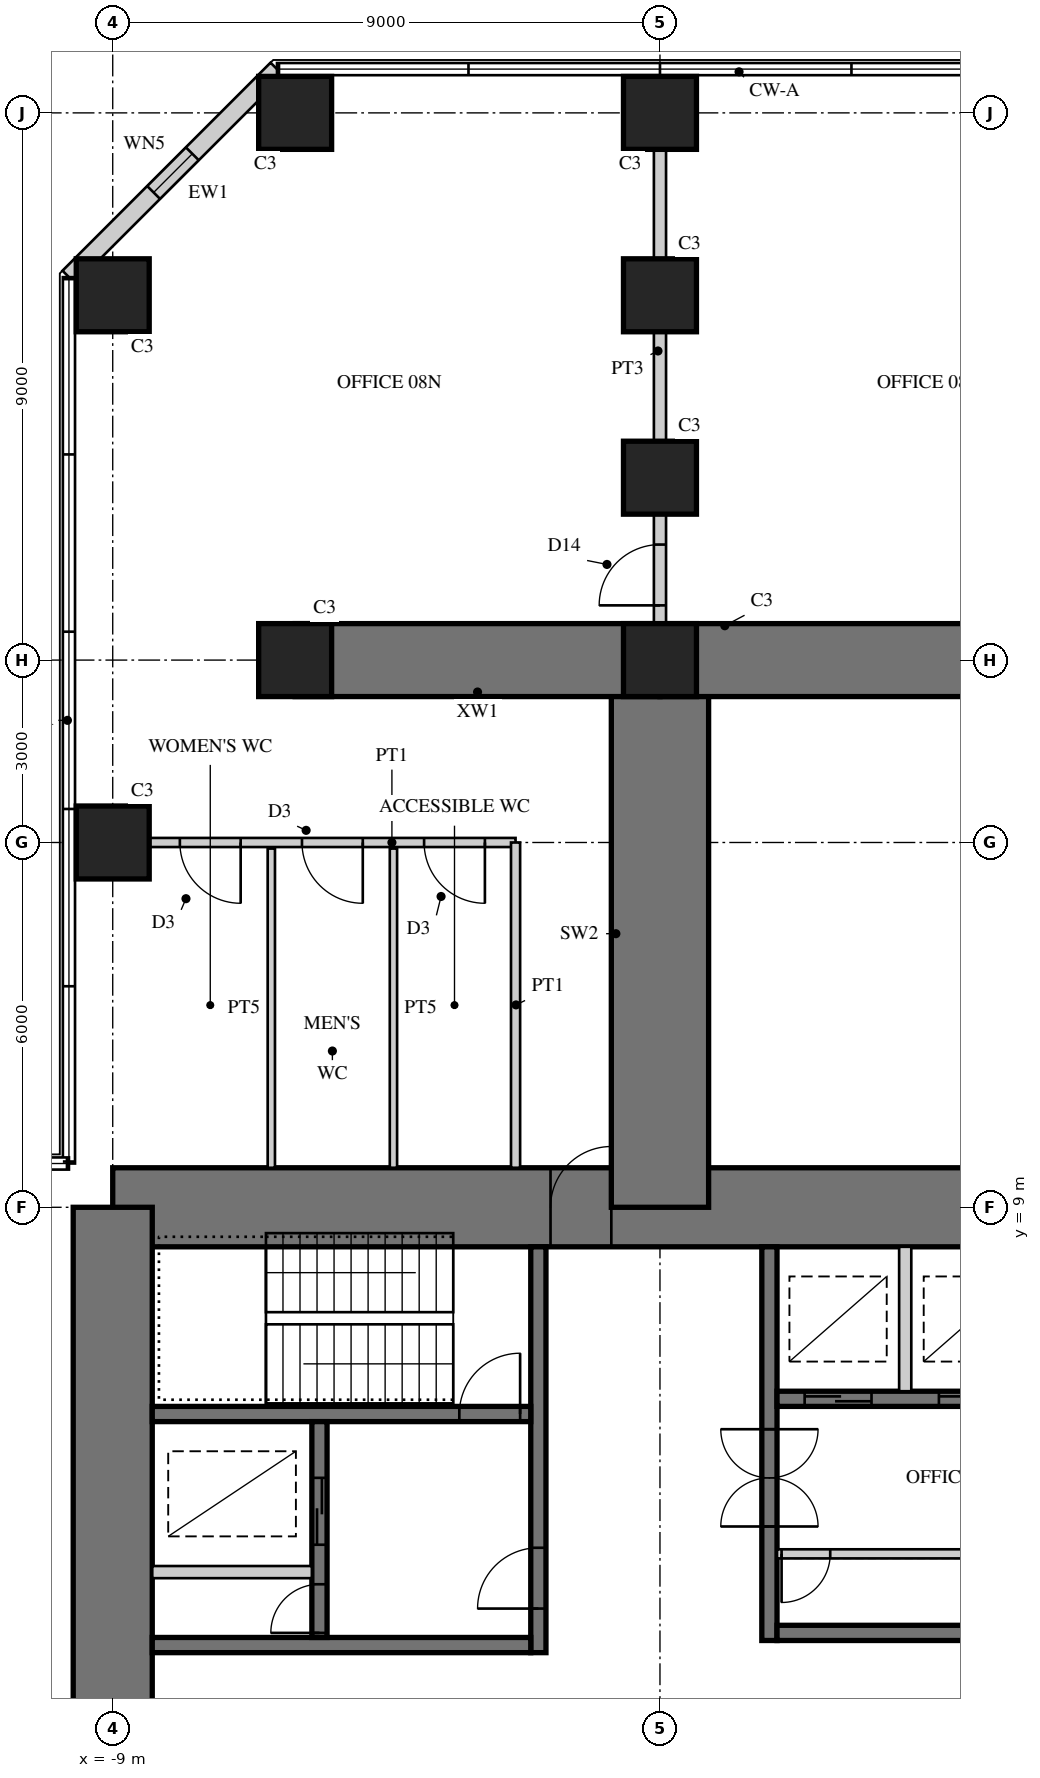
"""IFC4 building model, lengths in metres.
Left out: names, types, materials, properties, quantities, classifications, styles, units other than length and angle.
Written with IfcOpenShell. Run it as: python <this file> out.ifc"""

import sys

from ifc_helpers import new_model, si_unit, direction, frame, frame_2d, origin, origin_2d, place, context, subcontext, project, spatial, rectangle, hollow_rectangle, extrude, element, fill, save


model = new_model("IFC4")
c1 = context("Model", 3, precision=1e-05, world=origin(), true_north=direction((0.0, 1.0)))
c2 = subcontext(c1, "Body", "Model", "MODEL_VIEW")
j1 = project(units=[si_unit("LENGTHUNIT", "METRE"), si_unit("PLANEANGLEUNIT", "RADIAN")], contexts=[c1])
p1 = place(None, origin())
s1 = spatial("IfcSite", under=j1, at=p1, CompositionType="ELEMENT")
p2 = place(p1, origin())
s2 = spatial("IfcBuilding", under=s1, at=p2, CompositionType="ELEMENT")
p3 = place(p2, frame((0.0, 0.0, 35.5)))
s3 = spatial("IfcBuildingStorey", under=s2, at=p3, CompositionType="ELEMENT", Elevation=35.5)
p4 = place(p3, frame((9.0, 9.0, 0.0), z_axis=(0.0, 0.0, 1.0), x_axis=(-1.0, 0.0, 0.0)))
e1 = element("IfcWall", 1, at=p4, inside=s3, PredefinedType="SHEAR", context=c2, shape_type="SweptSolid", body=[
    extrude(rectangle(XDim=18.0, YDim=1.3, at=frame_2d((9.0, 0.0))), origin(), (0.0, 0.0, 1.0), 4.0),
])
p5 = place(p4, frame((9.8, 0.0, 0.0)))
e2 = element("IfcOpeningElement", 2, at=p5, cuts=e1, PredefinedType="OPENING", context=c2, shape_type="SweptSolid", body=[
    extrude(rectangle(XDim=1.0, YDim=2.4, at=frame_2d((0.5, 1.2))), frame((0.0, 0.66, 0.0), z_axis=(0.0, -1.0, 0.0), x_axis=(1.0, 0.0, 0.0)), (0.0, 0.0, 1.0), 1.32),
])
p6 = place(p3, frame((-9.0, 9.0, 0.0), z_axis=(0.0, 0.0, 1.0), x_axis=(0.0, -1.0, 0.0)))
e3 = element("IfcWall", 3, at=p6, inside=s3, PredefinedType="SHEAR", context=c2, shape_type="SweptSolid", body=[
    extrude(rectangle(XDim=18.0, YDim=1.3, at=frame_2d((9.0, 0.0))), origin(), (0.0, 0.0, 1.0), 4.0),
])
p7 = place(p6, frame((9.8, 0.0, 0.0)))
e4 = element("IfcOpeningElement", 4, at=p7, cuts=e3, PredefinedType="OPENING", context=c2, shape_type="SweptSolid", body=[
    extrude(rectangle(XDim=1.0, YDim=2.4, at=frame_2d((0.5, 1.2))), frame((0.0, 0.66, 0.0), z_axis=(0.0, -1.0, 0.0), x_axis=(1.0, 0.0, 0.0)), (0.0, 0.0, 1.0), 1.32),
])
p8 = place(p3, frame((1.8, 1.875, 0.0), z_axis=(0.0, 0.0, 1.0), x_axis=(0.0, 1.0, 0.0)))
e5 = element("IfcWall", 5, at=p8, inside=s3, PredefinedType="SHEAR", context=c2, shape_type="SweptSolid", body=[
    extrude(rectangle(XDim=6.475, YDim=0.25, at=frame_2d((3.238, 0.0))), origin(), (0.0, 0.0, 1.0), 4.0),
])
p9 = place(p8, frame((1.875, 0.0, 0.0)))
e6 = element("IfcOpeningElement", 6, at=p9, cuts=e5, PredefinedType="OPENING", context=c2, shape_type="SweptSolid", body=[
    extrude(rectangle(XDim=1.6, YDim=2.4, at=frame_2d((0.8, 1.2))), frame((0.0, 0.135, 0.0), z_axis=(0.0, -1.0, 0.0), x_axis=(1.0, 0.0, 0.0)), (0.0, 0.0, 1.0), 0.27),
])
p10 = place(p3, frame((1.925, 2.0, 0.0), z_axis=(0.0, 0.0, 1.0), x_axis=(1.0, 0.0, 0.0)))
e7 = element("IfcWall", 7, at=p10, inside=s3, PredefinedType="SHEAR", context=c2, shape_type="SweptSolid", body=[
    extrude(rectangle(XDim=6.425, YDim=0.25, at=frame_2d((3.212, 0.0))), origin(), (0.0, 0.0, 1.0), 4.0),
])
p11 = place(p3, frame((1.925, 5.85, 0.0), z_axis=(0.0, 0.0, 1.0), x_axis=(1.0, 0.0, 0.0)))
e8 = element("IfcWall", 8, at=p11, inside=s3, PredefinedType="SHEAR", context=c2, shape_type="SweptSolid", body=[
    extrude(rectangle(XDim=6.425, YDim=0.25, at=frame_2d((3.212, 0.0))), origin(), (0.0, 0.0, 1.0), 4.0),
])
p12 = place(p11, frame((0.454, 0.0, 0.0)))
e9 = element("IfcOpeningElement", 9, at=p12, cuts=e8, PredefinedType="OPENING", context=c2, shape_type="SweptSolid", body=[
    extrude(rectangle(XDim=1.1, YDim=2.2, at=frame_2d((0.55, 1.1))), frame((0.0, 0.135, 0.0), z_axis=(0.0, -1.0, 0.0), x_axis=(1.0, 0.0, 0.0)), (0.0, 0.0, 1.0), 0.27),
])
p13 = place(p11, frame((2.663, 0.0, 0.0)))
e10 = element("IfcOpeningElement", 10, at=p13, cuts=e8, PredefinedType="OPENING", context=c2, shape_type="SweptSolid", body=[
    extrude(rectangle(XDim=1.1, YDim=2.2, at=frame_2d((0.55, 1.1))), frame((0.0, 0.135, 0.0), z_axis=(0.0, -1.0, 0.0), x_axis=(1.0, 0.0, 0.0)), (0.0, 0.0, 1.0), 0.27),
])
p14 = place(p11, frame((4.871, 0.0, 0.0)))
e11 = element("IfcOpeningElement", 11, at=p14, cuts=e8, PredefinedType="OPENING", context=c2, shape_type="SweptSolid", body=[
    extrude(rectangle(XDim=1.1, YDim=2.2, at=frame_2d((0.55, 1.1))), frame((0.0, 0.135, 0.0), z_axis=(0.0, -1.0, 0.0), x_axis=(1.0, 0.0, 0.0)), (0.0, 0.0, 1.0), 0.27),
])
p15 = place(p3, frame((1.925, 3.3, 0.0), z_axis=(0.0, 0.0, 1.0), x_axis=(1.0, 0.0, 0.0)))
e12 = element("IfcWall", 12, at=p15, inside=s3, PredefinedType="PARTITIONING", context=c2, shape_type="SweptSolid", body=[
    extrude(rectangle(XDim=6.425, YDim=0.15, at=frame_2d((3.212, 0.0))), origin(), (0.0, 0.0, 1.0), 4.0),
])
p16 = place(p15, frame((0.075, 0.0, 0.0)))
e13 = element("IfcOpeningElement", 13, at=p16, cuts=e12, PredefinedType="OPENING", context=c2, shape_type="SweptSolid", body=[
    extrude(rectangle(XDim=0.8, YDim=2.1, at=frame_2d((0.4, 1.05))), frame((0.0, 0.085, 0.0), z_axis=(0.0, -1.0, 0.0), x_axis=(1.0, 0.0, 0.0)), (0.0, 0.0, 1.0), 0.17),
])
p17 = place(p15, frame((3.675, 0.0, 0.0)))
e14 = element("IfcOpeningElement", 14, at=p17, cuts=e12, PredefinedType="OPENING", context=c2, shape_type="SweptSolid", body=[
    extrude(rectangle(XDim=0.8, YDim=2.1, at=frame_2d((0.4, 1.05))), frame((0.0, 0.085, 0.0), z_axis=(0.0, -1.0, 0.0), x_axis=(1.0, 0.0, 0.0)), (0.0, 0.0, 1.0), 0.17),
])
p18 = place(p3, frame((4.033, 5.975, 0.0), z_axis=(0.0, 0.0, 1.0), x_axis=(0.0, 1.0, 0.0)))
e15 = element("IfcWall", 15, at=p18, inside=s3, PredefinedType="PARTITIONING", context=c2, shape_type="SweptSolid", body=[
    extrude(rectangle(XDim=2.375, YDim=0.2, at=frame_2d((1.188, 0.0))), origin(), (0.0, 0.0, 1.0), 4.0),
])
p19 = place(p3, frame((-2.0, 1.675, 0.0), z_axis=(0.0, 0.0, 1.0), x_axis=(0.0, 1.0, 0.0)))
e16 = element("IfcWall", 16, at=p19, inside=s3, PredefinedType="SHEAR", context=c2, shape_type="SweptSolid", body=[
    extrude(rectangle(XDim=6.675, YDim=0.25, at=frame_2d((3.337, 0.0))), origin(), (0.0, 0.0, 1.0), 4.0),
])
p20 = place(p19, frame((0.725, 0.0, 0.0)))
e17 = element("IfcOpeningElement", 17, at=p20, cuts=e16, PredefinedType="OPENING", context=c2, shape_type="SweptSolid", body=[
    extrude(rectangle(XDim=1.0, YDim=2.1, at=frame_2d((0.5, 1.05))), frame((0.0, 0.135, 0.0), z_axis=(0.0, -1.0, 0.0), x_axis=(1.0, 0.0, 0.0)), (0.0, 0.0, 1.0), 0.27),
])
p21 = place(p3, frame((-2.125, 1.8, 0.0), z_axis=(0.0, 0.0, 1.0), x_axis=(-1.0, 0.0, 0.0)))
e18 = element("IfcWall", 18, at=p21, inside=s3, PredefinedType="SHEAR", context=c2, shape_type="SweptSolid", body=[
    extrude(rectangle(XDim=6.225, YDim=0.25, at=frame_2d((3.113, 0.0))), origin(), (0.0, 0.0, 1.0), 4.0),
])
p22 = place(p3, frame((-2.125, 5.6, 0.0), z_axis=(0.0, 0.0, 1.0), x_axis=(-1.0, 0.0, 0.0)))
e19 = element("IfcWall", 19, at=p22, inside=s3, PredefinedType="SHEAR", context=c2, shape_type="SweptSolid", body=[
    extrude(rectangle(XDim=6.225, YDim=0.25, at=frame_2d((3.113, 0.0))), origin(), (0.0, 0.0, 1.0), 4.0),
])
p23 = place(p22, frame((0.175, 0.0, 0.0)))
e20 = element("IfcOpeningElement", 20, at=p23, cuts=e19, PredefinedType="OPENING", context=c2, shape_type="SweptSolid", body=[
    extrude(rectangle(XDim=1.0, YDim=2.1, at=frame_2d((0.5, 1.05))), frame((0.0, 0.135, 0.0), z_axis=(0.0, -1.0, 0.0), x_axis=(1.0, 0.0, 0.0)), (0.0, 0.0, 1.0), 0.27),
])
p24 = place(p3, frame((-5.6, 1.925, 0.0), z_axis=(0.0, 0.0, 1.0), x_axis=(0.0, 1.0, 0.0)))
e21 = element("IfcWall", 21, at=p24, inside=s3, PredefinedType="SHEAR", context=c2, shape_type="SweptSolid", body=[
    extrude(rectangle(XDim=3.55, YDim=0.25, at=frame_2d((1.775, 0.0))), origin(), (0.0, 0.0, 1.0), 4.0),
])
p25 = place(p24, frame((1.525, 0.0, 0.0)))
e22 = element("IfcOpeningElement", 22, at=p25, cuts=e21, PredefinedType="OPENING", context=c2, shape_type="SweptSolid", body=[
    extrude(rectangle(XDim=1.1, YDim=2.2, at=frame_2d((0.55, 1.1))), frame((0.0, 0.135, 0.0), z_axis=(0.0, -1.0, 0.0), x_axis=(1.0, 0.0, 0.0)), (0.0, 0.0, 1.0), 0.27),
])
p26 = place(p24, frame((0.075, 0.0, 0.0)))
e23 = element("IfcOpeningElement", 23, at=p26, cuts=e21, PredefinedType="OPENING", context=c2, shape_type="SweptSolid", body=[
    extrude(rectangle(XDim=0.8, YDim=2.1, at=frame_2d((0.4, 1.05))), frame((0.0, 0.135, 0.0), z_axis=(0.0, -1.0, 0.0), x_axis=(1.0, 0.0, 0.0)), (0.0, 0.0, 1.0), 0.27),
])
p27 = place(p3, frame((-5.725, 3.0, 0.0), z_axis=(0.0, 0.0, 1.0), x_axis=(-1.0, 0.0, 0.0)))
e24 = element("IfcWall", 24, at=p27, inside=s3, PredefinedType="PARTITIONING", context=c2, shape_type="SweptSolid", body=[
    extrude(rectangle(XDim=2.625, YDim=0.2, at=frame_2d((1.312, 0.0))), origin(), (0.0, 0.0, 1.0), 4.0),
])
p28 = place(p3, frame((0.0, 9.0, 0.0), z_axis=(0.0, 0.0, 1.0), x_axis=(0.0, 1.0, 0.0)))
e25 = element("IfcWall", 25, at=p28, inside=s3, PredefinedType="SHEAR", context=c2, shape_type="SweptSolid", body=[
    extrude(rectangle(XDim=9.0, YDim=1.6, at=frame_2d((4.5, 0.0))), origin(), (0.0, 0.0, 1.0), 4.0),
])
for number, where, z_axis, x_axis in (
    (26, (0.0, 18.0, 0.0), (0.0, 0.0, 1.0), (-1.0, 0.0, 0.0)),
    (27, (0.0, 18.0, 0.0), (0.0, 0.0, 1.0), (1.0, 0.0, 0.0)),
):
    element("IfcWall", number, at=place(p3, frame(where, z_axis=z_axis, x_axis=x_axis)), inside=s3, PredefinedType="SHEAR", context=c2, shape_type="SweptSolid", body=[
        extrude(rectangle(XDim=6.0, YDim=1.2, at=frame_2d((3.0, 0.0))), origin(), (0.0, 0.0, 1.0), 4.0),
    ])
for number, where, z_axis, x_axis in (
    (28, (-9.0, 15.0, 0.0), (0.0, 0.0, 1.0), (1.0, 0.0, 0.0)),
    (29, (-9.0, 24.0, 0.0), (0.0, 0.0, 1.0), (1.0, 0.0, 0.0)),
    (30, (0.0, 27.0, 0.0), (0.0, 0.0, 1.0), (1.0, 0.0, 0.0)),
    (31, (-6.0, 27.0, 0.0), (0.0, 0.0, 1.0), (1.0, 0.0, 0.0)),
    (32, (0.0, 18.0, 0.0), (0.0, 0.0, 1.0), (1.0, 0.0, 0.0)),
    (33, (-6.0, 18.0, 0.0), (0.0, 0.0, 1.0), (1.0, 0.0, 0.0)),
    (34, (0.0, 21.0, 0.0), (0.0, 0.0, 1.0), (1.0, 0.0, 0.0)),
    (35, (0.0, 24.0, 0.0), (0.0, 0.0, 1.0), (1.0, 0.0, 0.0)),
):
    element("IfcColumn", number, at=place(p3, frame(where, z_axis=z_axis, x_axis=x_axis)), inside=s3, PredefinedType="COLUMN", context=c2, shape_type="SweptSolid", body=[
        extrude(rectangle(XDim=1.2, YDim=1.2, at=origin_2d()), origin(), (0.0, 0.0, 1.0), 4.0),
    ])
p29 = place(p3, frame((-6.298, 27.72, 0.0), z_axis=(0.0, 0.0, 1.0), x_axis=(-0.707106781187, -0.707106781187, 0.0)))
e36 = element("IfcWall", 36, at=p29, inside=s3, PredefinedType="SOLIDWALL", context=c2, shape_type="SweptSolid", body=[
    extrude(rectangle(XDim=4.839, YDim=0.3, at=frame_2d((2.419, 0.0))), origin(), (0.0, 0.0, 1.0), 3.8),
])
p30 = place(p29, frame((1.969, 0.0, 0.3)))
e37 = element("IfcOpeningElement", 37, at=p30, cuts=e36, PredefinedType="OPENING", context=c2, shape_type="SweptSolid", body=[
    extrude(rectangle(XDim=0.9, YDim=2.4, at=frame_2d((0.45, 1.2))), frame((0.0, 0.16, 0.0), z_axis=(0.0, -1.0, 0.0), x_axis=(1.0, 0.0, 0.0)), (0.0, 0.0, 1.0), 0.32),
])
p31 = place(p3, frame((-2.375, 15.0, 0.0), z_axis=(0.0, 0.0, 1.0), x_axis=(-1.0, 0.0, 0.0)))
e38 = element("IfcWall", 38, at=p31, inside=s3, PredefinedType="PARTITIONING", context=c2, shape_type="SweptSolid", body=[
    extrude(rectangle(XDim=6.025, YDim=0.15, at=frame_2d((3.012, 0.0))), origin(), (0.0, 0.0, 1.0), 2.95),
])
p32 = place(p31, frame((0.504, 0.0, 0.0)))
e39 = element("IfcOpeningElement", 39, at=p32, cuts=e38, PredefinedType="OPENING", context=c2, shape_type="SweptSolid", body=[
    extrude(rectangle(XDim=1.0, YDim=2.1, at=frame_2d((0.5, 1.05))), frame((0.0, 0.085, 0.0), z_axis=(0.0, -1.0, 0.0), x_axis=(1.0, 0.0, 0.0)), (0.0, 0.0, 1.0), 0.17),
])
p33 = place(p31, frame((2.512, 0.0, 0.0)))
e40 = element("IfcOpeningElement", 40, at=p33, cuts=e38, PredefinedType="OPENING", context=c2, shape_type="SweptSolid", body=[
    extrude(rectangle(XDim=1.0, YDim=2.1, at=frame_2d((0.5, 1.05))), frame((0.0, 0.085, 0.0), z_axis=(0.0, -1.0, 0.0), x_axis=(1.0, 0.0, 0.0)), (0.0, 0.0, 1.0), 0.17),
])
p34 = place(p31, frame((4.521, 0.0, 0.0)))
e41 = element("IfcOpeningElement", 41, at=p34, cuts=e38, PredefinedType="OPENING", context=c2, shape_type="SweptSolid", body=[
    extrude(rectangle(XDim=1.0, YDim=2.1, at=frame_2d((0.5, 1.05))), frame((0.0, 0.085, 0.0), z_axis=(0.0, -1.0, 0.0), x_axis=(1.0, 0.0, 0.0)), (0.0, 0.0, 1.0), 0.17),
])
p35 = place(p3, frame((-2.375, 9.65, 0.0), z_axis=(0.0, 0.0, 1.0), x_axis=(0.0, 1.0, 0.0)))
e42 = element("IfcWall", 42, at=p35, inside=s3, PredefinedType="PARTITIONING", context=c2, shape_type="SweptSolid", body=[
    extrude(rectangle(XDim=5.35, YDim=0.15, at=frame_2d((2.675, 0.0))), origin(), (0.0, 0.0, 1.0), 3.8),
])
for number, where, z_axis, x_axis in (
    (43, (-4.383, 9.65, 0.0), (0.0, 0.0, 1.0), (0.0, 1.0, 0.0)),
    (44, (-6.392, 9.65, 0.0), (0.0, 0.0, 1.0), (0.0, 1.0, 0.0)),
):
    element("IfcWall", number, at=place(p3, frame(where, z_axis=z_axis, x_axis=x_axis)), inside=s3, PredefinedType="PLUMBINGWALL", context=c2, shape_type="SweptSolid", body=[
        extrude(rectangle(XDim=5.25, YDim=0.12, at=frame_2d((2.625, 0.0))), origin(), (0.0, 0.0, 1.0), 3.8),
    ])
p36 = place(p3, frame((0.0, 18.0, 0.0), z_axis=(0.0, 0.0, 1.0), x_axis=(0.0, 1.0, 0.0)))
e45 = element("IfcWall", 45, at=p36, inside=s3, PredefinedType="SOLIDWALL", context=c2, shape_type="SweptSolid", body=[
    extrude(rectangle(XDim=3.0, YDim=0.2, at=frame_2d((1.5, 0.0))), origin(), (0.0, 0.0, 1.0), 3.8),
])
p37 = place(p36, frame((0.9, 0.0, 0.0)))
e46 = element("IfcOpeningElement", 46, at=p37, cuts=e45, PredefinedType="OPENING", context=c2, shape_type="SweptSolid", body=[
    extrude(rectangle(XDim=1.0, YDim=2.2, at=frame_2d((0.5, 1.1))), frame((0.0, 0.11, 0.0), z_axis=(0.0, -1.0, 0.0), x_axis=(1.0, 0.0, 0.0)), (0.0, 0.0, 1.0), 0.22),
])
p38 = place(p3, frame((0.0, 21.0, 0.0), z_axis=(0.0, 0.0, 1.0), x_axis=(0.0, 1.0, 0.0)))
e47 = element("IfcWall", 47, at=p38, inside=s3, PredefinedType="SOLIDWALL", context=c2, shape_type="SweptSolid", body=[
    extrude(rectangle(XDim=6.0, YDim=0.2, at=frame_2d((3.0, 0.0))), origin(), (0.0, 0.0, 1.0), 2.9),
])
p39 = place(p30, origin())
e48 = element("IfcWindow", 48, at=p39, inside=s3, PartitioningType="SINGLE_PANEL", PredefinedType="WINDOW", context=c2, shape_type="SweptSolid", body=[
    extrude(hollow_rectangle(XDim=0.9, YDim=2.4, WallThickness=0.06, at=frame_2d((0.45, 1.2))), frame((0.0, 0.03, 0.0), z_axis=(0.0, -1.0, 0.0), x_axis=(1.0, 0.0, 0.0)), (0.0, 0.0, 1.0), 0.06),
    extrude(rectangle(XDim=0.779, YDim=2.279, at=frame_2d((0.45, 1.2))), frame((0.0, 0.03, 0.0), z_axis=(0.0, -1.0, 0.0), x_axis=(1.0, 0.0, 0.0)), (0.0, 0.0, 1.0), 0.06),
])
fill(e37, e48)
p40 = place(p32, origin())
e49 = element("IfcDoor", 49, at=p40, inside=s3, OperationType="SINGLE_SWING_LEFT", PredefinedType="DOOR", context=c2, shape_type="SweptSolid", body=[
    extrude(rectangle(XDim=1.0, YDim=2.1, at=frame_2d((0.5, 1.05))), frame((0.0, 0.025, 0.0), z_axis=(0.0, -1.0, 0.0), x_axis=(1.0, 0.0, 0.0)), (0.0, 0.0, 1.0), 0.05),
])
fill(e39, e49)
p41 = place(p33, origin())
e50 = element("IfcDoor", 50, at=p41, inside=s3, OperationType="SINGLE_SWING_LEFT", PredefinedType="DOOR", context=c2, shape_type="SweptSolid", body=[
    extrude(rectangle(XDim=1.0, YDim=2.1, at=frame_2d((0.5, 1.05))), frame((0.0, 0.025, 0.0), z_axis=(0.0, -1.0, 0.0), x_axis=(1.0, 0.0, 0.0)), (0.0, 0.0, 1.0), 0.05),
])
fill(e40, e50)
p42 = place(p34, origin())
e51 = element("IfcDoor", 51, at=p42, inside=s3, OperationType="SINGLE_SWING_LEFT", PredefinedType="DOOR", context=c2, shape_type="SweptSolid", body=[
    extrude(rectangle(XDim=1.0, YDim=2.1, at=frame_2d((0.5, 1.05))), frame((0.0, 0.025, 0.0), z_axis=(0.0, -1.0, 0.0), x_axis=(1.0, 0.0, 0.0)), (0.0, 0.0, 1.0), 0.05),
])
fill(e41, e51)
p43 = place(p37, origin())
e52 = element("IfcDoor", 52, at=p43, inside=s3, OperationType="SINGLE_SWING_LEFT", PredefinedType="DOOR", context=c2, shape_type="SweptSolid", body=[
    extrude(rectangle(XDim=1.0, YDim=2.2, at=frame_2d((0.5, 1.1))), frame((0.0, 0.025, 0.0), z_axis=(0.0, -1.0, 0.0), x_axis=(1.0, 0.0, 0.0)), (0.0, 0.0, 1.0), 0.05),
])
fill(e46, e52)
p44 = place(p5, frame((1.0, 0.0, 0.0), z_axis=(0.0, 0.0, 1.0), x_axis=(-1.0, 0.0, 0.0)))
e53 = element("IfcDoor", 53, at=p44, inside=s3, OperationType="SINGLE_SWING_RIGHT", PredefinedType="DOOR", context=c2, shape_type="SweptSolid", body=[
    extrude(rectangle(XDim=1.0, YDim=2.4, at=frame_2d((0.5, 1.2))), frame((0.0, -0.005, 0.0), z_axis=(0.0, -1.0, 0.0), x_axis=(1.0, 0.0, 0.0)), (0.0, 0.0, 1.0), 0.05),
])
fill(e2, e53)
p45 = place(p12, origin())
e54 = element("IfcDoor", 54, at=p45, inside=s3, OperationType="DOUBLE_DOOR_SLIDING", PredefinedType="DOOR", context=c2, shape_type="SweptSolid", body=[
    extrude(rectangle(XDim=1.1, YDim=2.2, at=frame_2d((0.55, 1.1))), frame((0.0, 0.025, 0.0), z_axis=(0.0, -1.0, 0.0), x_axis=(1.0, 0.0, 0.0)), (0.0, 0.0, 1.0), 0.05),
])
fill(e9, e54)
p46 = place(p13, origin())
e55 = element("IfcDoor", 55, at=p46, inside=s3, OperationType="DOUBLE_DOOR_SLIDING", PredefinedType="DOOR", context=c2, shape_type="SweptSolid", body=[
    extrude(rectangle(XDim=1.1, YDim=2.2, at=frame_2d((0.55, 1.1))), frame((0.0, 0.025, 0.0), z_axis=(0.0, -1.0, 0.0), x_axis=(1.0, 0.0, 0.0)), (0.0, 0.0, 1.0), 0.05),
])
fill(e10, e55)
p47 = place(p9, origin())
e56 = element("IfcDoor", 56, at=p47, inside=s3, OperationType="DOUBLE_DOOR_DOUBLE_SWING", PredefinedType="DOOR", context=c2, shape_type="SweptSolid", body=[
    extrude(rectangle(XDim=1.6, YDim=2.4, at=frame_2d((0.8, 1.2))), frame((0.0, 0.025, 0.0), z_axis=(0.0, -1.0, 0.0), x_axis=(1.0, 0.0, 0.0)), (0.0, 0.0, 1.0), 0.05),
])
fill(e6, e56)
p48 = place(p16, frame((0.8, 0.0, 0.0), z_axis=(0.0, 0.0, 1.0), x_axis=(-1.0, 0.0, 0.0)))
e57 = element("IfcDoor", 57, at=p48, inside=s3, OperationType="SINGLE_SWING_RIGHT", PredefinedType="DOOR", context=c2, shape_type="SweptSolid", body=[
    extrude(rectangle(XDim=0.8, YDim=2.1, at=frame_2d((0.4, 1.05))), frame((0.0, 0.025, 0.0), z_axis=(0.0, -1.0, 0.0), x_axis=(1.0, 0.0, 0.0)), (0.0, 0.0, 1.0), 0.05),
])
fill(e13, e57)
p49 = place(p20, origin())
e58 = element("IfcDoor", 58, at=p49, inside=s3, OperationType="SINGLE_SWING_LEFT", PredefinedType="DOOR", context=c2, shape_type="SweptSolid", body=[
    extrude(rectangle(XDim=1.0, YDim=2.1, at=frame_2d((0.5, 1.05))), frame((0.0, 0.025, 0.0), z_axis=(0.0, -1.0, 0.0), x_axis=(1.0, 0.0, 0.0)), (0.0, 0.0, 1.0), 0.05),
])
fill(e17, e58)
p50 = place(p23, frame((1.0, 0.0, 0.0), z_axis=(0.0, 0.0, 1.0), x_axis=(-1.0, 0.0, 0.0)))
e59 = element("IfcDoor", 59, at=p50, inside=s3, OperationType="SINGLE_SWING_RIGHT", PredefinedType="DOOR", context=c2, shape_type="SweptSolid", body=[
    extrude(rectangle(XDim=1.0, YDim=2.1, at=frame_2d((0.5, 1.05))), frame((0.0, 0.025, 0.0), z_axis=(0.0, -1.0, 0.0), x_axis=(1.0, 0.0, 0.0)), (0.0, 0.0, 1.0), 0.05),
])
fill(e20, e59)
p51 = place(p25, origin())
e60 = element("IfcDoor", 60, at=p51, inside=s3, OperationType="DOUBLE_DOOR_SLIDING", PredefinedType="DOOR", context=c2, shape_type="SweptSolid", body=[
    extrude(rectangle(XDim=1.1, YDim=2.2, at=frame_2d((0.55, 1.1))), frame((0.0, 0.025, 0.0), z_axis=(0.0, -1.0, 0.0), x_axis=(1.0, 0.0, 0.0)), (0.0, 0.0, 1.0), 0.05),
])
fill(e22, e60)
p52 = place(p26, origin())
e61 = element("IfcDoor", 61, at=p52, inside=s3, OperationType="SINGLE_SWING_LEFT", PredefinedType="DOOR", context=c2, shape_type="SweptSolid", body=[
    extrude(rectangle(XDim=0.8, YDim=2.1, at=frame_2d((0.4, 1.05))), frame((0.0, 0.025, 0.0), z_axis=(0.0, -1.0, 0.0), x_axis=(1.0, 0.0, 0.0)), (0.0, 0.0, 1.0), 0.05),
])
fill(e23, e61)
save(model, sys.argv[1])
